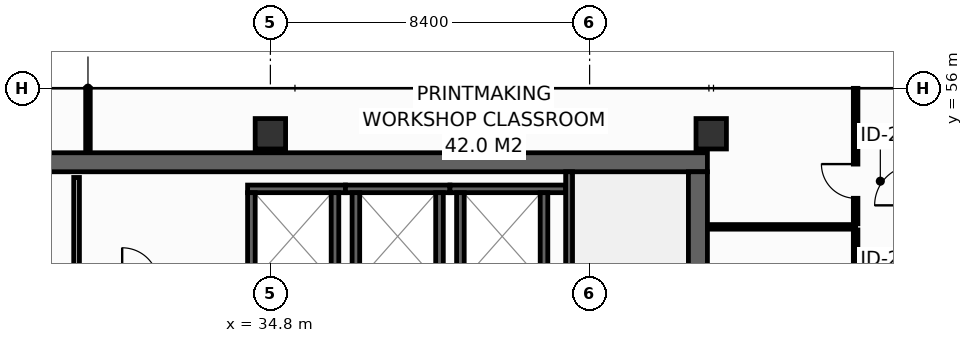
"""IFC4 building model, lengths in metres.
Left out: names, types, materials, properties, quantities, classifications, styles, units other than length and angle.
Written with IfcOpenShell. Run it as: python <this file> out.ifc"""

import sys

from ifc_helpers import new_model, si_unit, direction, frame, frame_2d, origin, origin_2d, place, context, subcontext, project, spatial, rectangle, hollow_rectangle, extrude, element, fill, save


model = new_model("IFC4")
c1 = context("Model", 3, precision=1e-05, world=origin(), true_north=direction((0.0, 1.0)))
c2 = subcontext(c1, "Body", "Model", "MODEL_VIEW")
j1 = project(units=[si_unit("LENGTHUNIT", "METRE"), si_unit("PLANEANGLEUNIT", "RADIAN")], contexts=[c1])
p1 = place(None, origin())
s1 = spatial("IfcSite", under=j1, at=p1, CompositionType="ELEMENT")
p2 = place(p1, origin())
s2 = spatial("IfcBuilding", under=s1, at=p2, CompositionType="ELEMENT")
p3 = place(p2, frame((0.0, 0.0, 213.2)))
s3 = spatial("IfcBuildingStorey", under=s2, at=p3, CompositionType="ELEMENT", Elevation=213.2)
p4 = place(p3, frame((13.6, 54.05, 0.0), z_axis=(0.0, 0.0, 1.0), x_axis=(1.0, 0.0, 0.0)))
e1 = element("IfcWall", 1, at=p4, inside=s3, PredefinedType="SHEAR", context=c2, shape_type="SweptSolid", body=[
    extrude(rectangle(XDim=32.7, YDim=0.5, at=frame_2d((16.35, 0.0))), origin(), (0.0, 0.0, 1.0), 3.55),
])
p5 = place(p3, frame((46.05, 43.4, 0.0), z_axis=(0.0, 0.0, 1.0), x_axis=(0.0, 1.0, 0.0)))
e2 = element("IfcWall", 2, at=p5, inside=s3, PredefinedType="SHEAR", context=c2, shape_type="SweptSolid", body=[
    extrude(rectangle(XDim=10.4, YDim=0.5, at=frame_2d((5.2, 0.0))), origin(), (0.0, 0.0, 1.0), 3.55),
])
for number, where, z_axis, x_axis in (
    (3, (34.8, 54.8, 0.0), (0.0, 0.0, 1.0), (1.0, 0.0, 0.0)),
    (4, (46.4, 54.8, 0.0), (0.0, 0.0, 1.0), (1.0, 0.0, 0.0)),
):
    element("IfcColumn", number, at=place(p3, frame(where, z_axis=z_axis, x_axis=x_axis)), inside=s3, PredefinedType="COLUMN", context=c2, shape_type="SweptSolid", body=[
        extrude(hollow_rectangle(XDim=0.8, YDim=0.8, WallThickness=0.036, at=origin_2d()), origin(), (0.0, 0.0, 1.0), 3.8),
    ])
p6 = place(p3, frame((34.2, 53.35, 0.0), z_axis=(0.0, 0.0, 1.0), x_axis=(1.0, 0.0, 0.0)))
e5 = element("IfcWall", 5, at=p6, inside=s3, PredefinedType="SHEAR", context=c2, shape_type="SweptSolid", body=[
    extrude(rectangle(XDim=2.575, YDim=0.2, at=frame_2d((1.288, 0.0))), origin(), (0.0, 0.0, 1.0), 3.55),
])
for number, where, z_axis, x_axis in (
    (6, (34.3, 50.95, 0.0), (0.0, 0.0, 1.0), (0.0, 1.0, 0.0)),
    (7, (36.5, 50.95, 0.0), (0.0, 0.0, 1.0), (0.0, 1.0, 0.0)),
):
    element("IfcWall", number, at=place(p3, frame(where, z_axis=z_axis, x_axis=x_axis)), inside=s3, PredefinedType="SHEAR", context=c2, shape_type="SweptSolid", body=[
        extrude(rectangle(XDim=2.3, YDim=0.2, at=frame_2d((1.15, 0.0))), origin(), (0.0, 0.0, 1.0), 3.55),
    ])
p7 = place(p3, frame((36.775, 53.35, 0.0), z_axis=(0.0, 0.0, 1.0), x_axis=(1.0, 0.0, 0.0)))
e8 = element("IfcWall", 8, at=p7, inside=s3, PredefinedType="SHEAR", context=c2, shape_type="SweptSolid", body=[
    extrude(rectangle(XDim=2.75, YDim=0.2, at=frame_2d((1.375, 0.0))), origin(), (0.0, 0.0, 1.0), 3.55),
])
for number, where, z_axis, x_axis in (
    (9, (37.05, 50.95, 0.0), (0.0, 0.0, 1.0), (0.0, 1.0, 0.0)),
    (10, (39.25, 50.95, 0.0), (0.0, 0.0, 1.0), (0.0, 1.0, 0.0)),
):
    element("IfcWall", number, at=place(p3, frame(where, z_axis=z_axis, x_axis=x_axis)), inside=s3, PredefinedType="SHEAR", context=c2, shape_type="SweptSolid", body=[
        extrude(rectangle(XDim=2.3, YDim=0.2, at=frame_2d((1.15, 0.0))), origin(), (0.0, 0.0, 1.0), 3.55),
    ])
p8 = place(p3, frame((39.525, 53.35, 0.0), z_axis=(0.0, 0.0, 1.0), x_axis=(1.0, 0.0, 0.0)))
e11 = element("IfcWall", 11, at=p8, inside=s3, PredefinedType="SHEAR", context=c2, shape_type="SweptSolid", body=[
    extrude(rectangle(XDim=3.045, YDim=0.2, at=frame_2d((1.522, 0.0))), origin(), (0.0, 0.0, 1.0), 3.55),
])
for number, where, z_axis, x_axis in (
    (12, (39.8, 50.95, 0.0), (0.0, 0.0, 1.0), (0.0, 1.0, 0.0)),
    (13, (42.0, 50.95, 0.0), (0.0, 0.0, 1.0), (0.0, 1.0, 0.0)),
):
    element("IfcWall", number, at=place(p3, frame(where, z_axis=z_axis, x_axis=x_axis)), inside=s3, PredefinedType="SHEAR", context=c2, shape_type="SweptSolid", body=[
        extrude(rectangle(XDim=2.3, YDim=0.2, at=frame_2d((1.15, 0.0))), origin(), (0.0, 0.0, 1.0), 3.55),
    ])
p9 = place(p3, frame((42.66, 53.8, 0.0), z_axis=(0.0, 0.0, 1.0), x_axis=(0.0, -1.0, 0.0)))
e14 = element("IfcWall", 14, at=p9, inside=s3, PredefinedType="SHEAR", context=c2, shape_type="SweptSolid", body=[
    extrude(rectangle(XDim=10.4, YDim=0.18, at=frame_2d((5.2, 0.0))), origin(), (0.0, 0.0, 1.0), 3.55),
])
p10 = place(p9, frame((8.99, 0.0, 0.0)))
e15 = element("IfcOpeningElement", 15, at=p10, cuts=e14, PredefinedType="OPENING", context=c2, shape_type="SweptSolid", body=[
    extrude(rectangle(XDim=1.1, YDim=2.15, at=frame_2d((0.55, 1.075))), frame((0.0, 0.1, 0.0), z_axis=(0.0, -1.0, 0.0), x_axis=(1.0, 0.0, 0.0)), (0.0, 0.0, 1.0), 0.2),
])
p11 = place(p3, frame((29.7, 50.95, 0.0), z_axis=(0.0, 0.0, 1.0), x_axis=(0.0, 1.0, 0.0)))
e16 = element("IfcWall", 16, at=p11, inside=s3, PredefinedType="PARTITIONING", context=c2, shape_type="SweptSolid", body=[
    extrude(rectangle(XDim=2.7, YDim=0.15, at=frame_2d((1.35, 0.0))), origin(), (0.0, 0.0, 1.0), 3.55),
])
p12 = place(p3, frame((46.32, 52.35, 0.0), z_axis=(0.0, 0.0, 1.0), x_axis=(1.0, 0.0, 0.0)))
e17 = element("IfcWall", 17, at=p12, inside=s3, PredefinedType="PARTITIONING", context=c2, shape_type="SweptSolid", body=[
    extrude(rectangle(XDim=3.88, YDim=0.12, at=frame_2d((1.94, 0.0))), origin(), (0.0, 0.0, 1.0), 3.55),
])
p13 = place(p3, frame((30.0, 54.32, 0.0), z_axis=(0.0, 0.0, 1.0), x_axis=(0.0, 1.0, 0.0)))
e18 = element("IfcWall", 18, at=p13, inside=s3, PredefinedType="PARTITIONING", context=c2, shape_type="SweptSolid", body=[
    extrude(rectangle(XDim=1.675, YDim=0.12, at=frame_2d((0.837, 0.0))), origin(), (0.0, 0.0, 1.0), 2.935),
])
p14 = place(p3, frame((50.2, 48.29, 0.0), z_axis=(0.0, 0.0, 1.0), x_axis=(0.0, 1.0, 0.0)))
e19 = element("IfcWall", 19, at=p14, inside=s3, PredefinedType="PARTITIONING", context=c2, shape_type="SweptSolid", body=[
    extrude(rectangle(XDim=3.98, YDim=0.12, at=frame_2d((1.99, 0.0))), origin(), (0.0, 0.0, 1.0), 3.55),
])
p15 = place(p14, frame((1.54, 0.0, 0.0)))
e20 = element("IfcOpeningElement", 20, at=p15, cuts=e19, PredefinedType="OPENING", context=c2, shape_type="SweptSolid", body=[
    extrude(rectangle(XDim=0.9, YDim=2.1, at=frame_2d((0.45, 1.05))), frame((0.0, 0.07, 0.0), z_axis=(0.0, -1.0, 0.0), x_axis=(1.0, 0.0, 0.0)), (0.0, 0.0, 1.0), 0.14),
])
p16 = place(p3, frame((50.2, 52.43, 0.0), z_axis=(0.0, 0.0, 1.0), x_axis=(0.0, 1.0, 0.0)))
e21 = element("IfcWall", 21, at=p16, inside=s3, PredefinedType="PARTITIONING", context=c2, shape_type="SweptSolid", body=[
    extrude(rectangle(XDim=3.565, YDim=0.12, at=frame_2d((1.783, 0.0))), origin(), (0.0, 0.0, 1.0), 2.935),
])
p17 = place(p16, frame((0.672, 0.0, 0.0)))
e22 = element("IfcOpeningElement", 22, at=p17, cuts=e21, PredefinedType="OPENING", context=c2, shape_type="SweptSolid", body=[
    extrude(rectangle(XDim=0.9, YDim=2.1, at=frame_2d((0.45, 1.05))), frame((0.0, 0.07, 0.0), z_axis=(0.0, -1.0, 0.0), x_axis=(1.0, 0.0, 0.0)), (0.0, 0.0, 1.0), 0.14),
])
p18 = place(p17, origin())
e23 = element("IfcDoor", 23, at=p18, inside=s3, OperationType="SINGLE_SWING_RIGHT", PredefinedType="DOOR", context=c2, shape_type="SweptSolid", body=[
    extrude(rectangle(XDim=0.9, YDim=2.1, at=frame_2d((0.45, 1.05))), frame((0.0, 0.025, 0.0), z_axis=(0.0, -1.0, 0.0), x_axis=(1.0, 0.0, 0.0)), (0.0, 0.0, 1.0), 0.05),
])
fill(e22, e23)
save(model, sys.argv[1])
